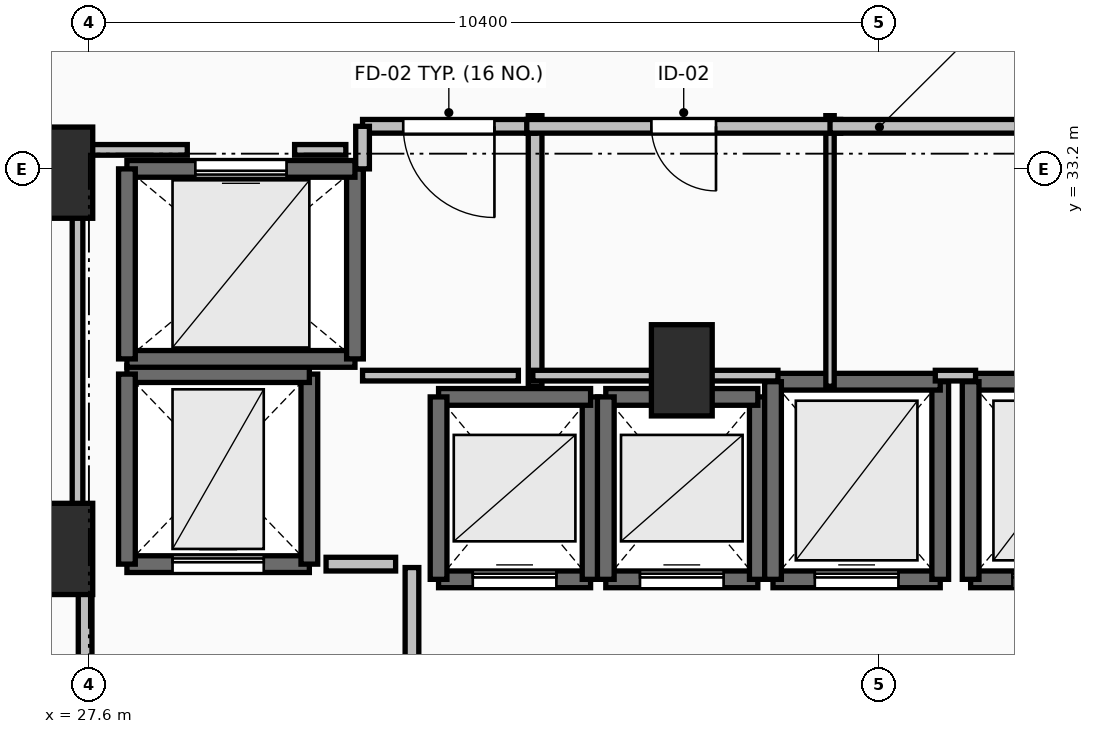
"""IFC4 building model, lengths in metres.
Left out: names, types, materials, properties, quantities, classifications, styles, units other than length and angle.
Written with IfcOpenShell. Run it as: python <this file> out.ifc"""

import sys

from ifc_helpers import new_model, si_unit, direction, frame, frame_2d, origin, origin_2d, place, context, subcontext, project, spatial, rectangle, extrude, element, fill, save


model = new_model("IFC4")
c1 = context("Model", 3, precision=1e-05, world=origin(), true_north=direction((0.0, 1.0)))
c2 = subcontext(c1, "Body", "Model", "MODEL_VIEW")
j1 = project(units=[si_unit("LENGTHUNIT", "METRE"), si_unit("PLANEANGLEUNIT", "RADIAN")], contexts=[c1])
p1 = place(None, origin())
s1 = spatial("IfcSite", under=j1, at=p1, CompositionType="ELEMENT")
p2 = place(p1, origin())
s2 = spatial("IfcBuilding", under=s1, at=p2, CompositionType="ELEMENT")
p3 = place(p2, origin())
s3 = spatial("IfcBuildingStorey", under=s2, at=p3, CompositionType="ELEMENT", Elevation=0.0)
for number, where, z_axis, x_axis in (
    (1, (27.25, 28.2, 0.0), (0.0, 0.0, 1.0), (1.0, 0.0, 0.0)),
    (2, (27.25, 33.15, 0.0), (0.0, 0.0, 1.0), (1.0, 0.0, 0.0)),
    (3, (35.4, 30.55, 0.0), (0.0, 0.0, 1.0), (1.0, 0.0, 0.0)),
):
    element("IfcColumn", number, at=place(p3, frame(where, z_axis=z_axis, x_axis=x_axis)), inside=s3, PredefinedType="PILASTER", context=c2, shape_type="SweptSolid", body=[
        extrude(rectangle(XDim=0.8, YDim=1.2, at=origin_2d()), origin(), (0.0, 0.0, 1.0), 4.8),
    ])
p4 = place(p3, frame((32.2, 27.8, 0.0), z_axis=(0.0, 0.0, 1.0), x_axis=(1.0, 0.0, 0.0)))
e4 = element("IfcWall", 4, at=p4, inside=s3, PredefinedType="SOLIDWALL", context=c2, shape_type="SweptSolid", body=[
    extrude(rectangle(XDim=2.0, YDim=0.22, at=frame_2d((1.0, 0.0))), origin(), (0.0, 0.0, 1.0), 4.48),
])
p5 = place(p4, frame((0.45, 0.0, 0.0)))
e5 = element("IfcOpeningElement", 5, at=p5, cuts=e4, PredefinedType="OPENING", context=c2, shape_type="SweptSolid", body=[
    extrude(rectangle(XDim=1.1, YDim=2.2, at=frame_2d((0.55, 1.1))), frame((0.0, 0.125, 0.0), z_axis=(0.0, -1.0, 0.0), x_axis=(1.0, 0.0, 0.0)), (0.0, 0.0, 1.0), 0.25),
])
p6 = place(p3, frame((34.2, 27.8, 0.0), z_axis=(0.0, 0.0, 1.0), x_axis=(0.0, 1.0, 0.0)))
e6 = element("IfcWall", 6, at=p6, inside=s3, PredefinedType="SOLIDWALL", context=c2, shape_type="SweptSolid", body=[
    extrude(rectangle(XDim=2.4, YDim=0.22, at=frame_2d((1.2, 0.0))), origin(), (0.0, 0.0, 1.0), 4.48),
])
p7 = place(p3, frame((34.2, 30.2, 0.0), z_axis=(0.0, 0.0, 1.0), x_axis=(-1.0, 0.0, 0.0)))
e7 = element("IfcWall", 7, at=p7, inside=s3, PredefinedType="SOLIDWALL", context=c2, shape_type="SweptSolid", body=[
    extrude(rectangle(XDim=2.0, YDim=0.22, at=frame_2d((1.0, 0.0))), origin(), (0.0, 0.0, 1.0), 4.48),
])
p8 = place(p3, frame((32.2, 30.2, 0.0), z_axis=(0.0, 0.0, 1.0), x_axis=(0.0, -1.0, 0.0)))
e8 = element("IfcWall", 8, at=p8, inside=s3, PredefinedType="SOLIDWALL", context=c2, shape_type="SweptSolid", body=[
    extrude(rectangle(XDim=2.4, YDim=0.22, at=frame_2d((1.2, 0.0))), origin(), (0.0, 0.0, 1.0), 4.48),
])
p9 = place(p3, frame((34.4, 27.8, 0.0), z_axis=(0.0, 0.0, 1.0), x_axis=(1.0, 0.0, 0.0)))
e9 = element("IfcWall", 9, at=p9, inside=s3, PredefinedType="SOLIDWALL", context=c2, shape_type="SweptSolid", body=[
    extrude(rectangle(XDim=2.0, YDim=0.22, at=frame_2d((1.0, 0.0))), origin(), (0.0, 0.0, 1.0), 4.48),
])
p10 = place(p9, frame((0.45, 0.0, 0.0)))
e10 = element("IfcOpeningElement", 10, at=p10, cuts=e9, PredefinedType="OPENING", context=c2, shape_type="SweptSolid", body=[
    extrude(rectangle(XDim=1.1, YDim=2.2, at=frame_2d((0.55, 1.1))), frame((0.0, 0.125, 0.0), z_axis=(0.0, -1.0, 0.0), x_axis=(1.0, 0.0, 0.0)), (0.0, 0.0, 1.0), 0.25),
])
p11 = place(p3, frame((36.4, 27.8, 0.0), z_axis=(0.0, 0.0, 1.0), x_axis=(0.0, 1.0, 0.0)))
e11 = element("IfcWall", 11, at=p11, inside=s3, PredefinedType="SOLIDWALL", context=c2, shape_type="SweptSolid", body=[
    extrude(rectangle(XDim=2.4, YDim=0.22, at=frame_2d((1.2, 0.0))), origin(), (0.0, 0.0, 1.0), 4.48),
])
p12 = place(p3, frame((36.4, 30.2, 0.0), z_axis=(0.0, 0.0, 1.0), x_axis=(-1.0, 0.0, 0.0)))
e12 = element("IfcWall", 12, at=p12, inside=s3, PredefinedType="SOLIDWALL", context=c2, shape_type="SweptSolid", body=[
    extrude(rectangle(XDim=2.0, YDim=0.22, at=frame_2d((1.0, 0.0))), origin(), (0.0, 0.0, 1.0), 4.48),
])
p13 = place(p3, frame((34.4, 30.2, 0.0), z_axis=(0.0, 0.0, 1.0), x_axis=(0.0, -1.0, 0.0)))
e13 = element("IfcWall", 13, at=p13, inside=s3, PredefinedType="SOLIDWALL", context=c2, shape_type="SweptSolid", body=[
    extrude(rectangle(XDim=2.4, YDim=0.22, at=frame_2d((1.2, 0.0))), origin(), (0.0, 0.0, 1.0), 4.48),
])
p14 = place(p3, frame((36.6, 27.8, 0.0), z_axis=(0.0, 0.0, 1.0), x_axis=(1.0, 0.0, 0.0)))
e14 = element("IfcWall", 14, at=p14, inside=s3, PredefinedType="SOLIDWALL", context=c2, shape_type="SweptSolid", body=[
    extrude(rectangle(XDim=2.2, YDim=0.22, at=frame_2d((1.1, 0.0))), origin(), (0.0, 0.0, 1.0), 4.48),
])
p15 = place(p14, frame((0.55, 0.0, 0.0)))
e15 = element("IfcOpeningElement", 15, at=p15, cuts=e14, PredefinedType="OPENING", context=c2, shape_type="SweptSolid", body=[
    extrude(rectangle(XDim=1.1, YDim=2.2, at=frame_2d((0.55, 1.1))), frame((0.0, 0.125, 0.0), z_axis=(0.0, -1.0, 0.0), x_axis=(1.0, 0.0, 0.0)), (0.0, 0.0, 1.0), 0.25),
])
p16 = place(p3, frame((38.8, 27.8, 0.0), z_axis=(0.0, 0.0, 1.0), x_axis=(0.0, 1.0, 0.0)))
e16 = element("IfcWall", 16, at=p16, inside=s3, PredefinedType="SOLIDWALL", context=c2, shape_type="SweptSolid", body=[
    extrude(rectangle(XDim=2.6, YDim=0.22, at=frame_2d((1.3, 0.0))), origin(), (0.0, 0.0, 1.0), 4.48),
])
p17 = place(p3, frame((38.8, 30.4, 0.0), z_axis=(0.0, 0.0, 1.0), x_axis=(-1.0, 0.0, 0.0)))
e17 = element("IfcWall", 17, at=p17, inside=s3, PredefinedType="SOLIDWALL", context=c2, shape_type="SweptSolid", body=[
    extrude(rectangle(XDim=2.2, YDim=0.22, at=frame_2d((1.1, 0.0))), origin(), (0.0, 0.0, 1.0), 4.48),
])
p18 = place(p3, frame((36.6, 30.4, 0.0), z_axis=(0.0, 0.0, 1.0), x_axis=(0.0, -1.0, 0.0)))
e18 = element("IfcWall", 18, at=p18, inside=s3, PredefinedType="SOLIDWALL", context=c2, shape_type="SweptSolid", body=[
    extrude(rectangle(XDim=2.6, YDim=0.22, at=frame_2d((1.3, 0.0))), origin(), (0.0, 0.0, 1.0), 4.48),
])
p19 = place(p3, frame((39.2, 27.8, 0.0), z_axis=(0.0, 0.0, 1.0), x_axis=(1.0, 0.0, 0.0)))
e19 = element("IfcWall", 19, at=p19, inside=s3, PredefinedType="SOLIDWALL", context=c2, shape_type="SweptSolid", body=[
    extrude(rectangle(XDim=2.2, YDim=0.22, at=frame_2d((1.1, 0.0))), origin(), (0.0, 0.0, 1.0), 4.48),
])
p20 = place(p19, frame((0.55, 0.0, 0.0)))
e20 = element("IfcOpeningElement", 20, at=p20, cuts=e19, PredefinedType="OPENING", context=c2, shape_type="SweptSolid", body=[
    extrude(rectangle(XDim=1.1, YDim=2.2, at=frame_2d((0.55, 1.1))), frame((0.0, 0.125, 0.0), z_axis=(0.0, -1.0, 0.0), x_axis=(1.0, 0.0, 0.0)), (0.0, 0.0, 1.0), 0.25),
])
p21 = place(p3, frame((41.4, 30.4, 0.0), z_axis=(0.0, 0.0, 1.0), x_axis=(-1.0, 0.0, 0.0)))
e21 = element("IfcWall", 21, at=p21, inside=s3, PredefinedType="SOLIDWALL", context=c2, shape_type="SweptSolid", body=[
    extrude(rectangle(XDim=2.2, YDim=0.22, at=frame_2d((1.1, 0.0))), origin(), (0.0, 0.0, 1.0), 4.48),
])
p22 = place(p3, frame((39.2, 30.4, 0.0), z_axis=(0.0, 0.0, 1.0), x_axis=(0.0, -1.0, 0.0)))
e22 = element("IfcWall", 22, at=p22, inside=s3, PredefinedType="SOLIDWALL", context=c2, shape_type="SweptSolid", body=[
    extrude(rectangle(XDim=2.6, YDim=0.22, at=frame_2d((1.3, 0.0))), origin(), (0.0, 0.0, 1.0), 4.48),
])
p23 = place(p3, frame((28.1, 28.0, 0.0), z_axis=(0.0, 0.0, 1.0), x_axis=(1.0, 0.0, 0.0)))
e23 = element("IfcWall", 23, at=p23, inside=s3, PredefinedType="SHEAR", context=c2, shape_type="SweptSolid", body=[
    extrude(rectangle(XDim=2.4, YDim=0.22, at=frame_2d((1.2, 0.0))), origin(), (0.0, 0.0, 1.0), 4.48),
])
p24 = place(p23, frame((0.6, 0.0, 0.0)))
e24 = element("IfcOpeningElement", 24, at=p24, cuts=e23, PredefinedType="OPENING", context=c2, shape_type="SweptSolid", body=[
    extrude(rectangle(XDim=1.2, YDim=2.2, at=frame_2d((0.6, 1.1))), frame((0.0, 0.125, 0.0), z_axis=(0.0, -1.0, 0.0), x_axis=(1.0, 0.0, 0.0)), (0.0, 0.0, 1.0), 0.25),
])
p25 = place(p3, frame((30.5, 28.0, 0.0), z_axis=(0.0, 0.0, 1.0), x_axis=(0.0, 1.0, 0.0)))
e25 = element("IfcWall", 25, at=p25, inside=s3, PredefinedType="SHEAR", context=c2, shape_type="SweptSolid", body=[
    extrude(rectangle(XDim=2.5, YDim=0.22, at=frame_2d((1.25, 0.0))), origin(), (0.0, 0.0, 1.0), 4.48),
])
p26 = place(p3, frame((30.5, 30.5, 0.0), z_axis=(0.0, 0.0, 1.0), x_axis=(-1.0, 0.0, 0.0)))
e26 = element("IfcWall", 26, at=p26, inside=s3, PredefinedType="SHEAR", context=c2, shape_type="SweptSolid", body=[
    extrude(rectangle(XDim=2.4, YDim=0.22, at=frame_2d((1.2, 0.0))), origin(), (0.0, 0.0, 1.0), 4.48),
])
p27 = place(p3, frame((28.1, 30.5, 0.0), z_axis=(0.0, 0.0, 1.0), x_axis=(0.0, -1.0, 0.0)))
e27 = element("IfcWall", 27, at=p27, inside=s3, PredefinedType="SHEAR", context=c2, shape_type="SweptSolid", body=[
    extrude(rectangle(XDim=2.5, YDim=0.22, at=frame_2d((1.25, 0.0))), origin(), (0.0, 0.0, 1.0), 4.48),
])
p28 = place(p3, frame((28.1, 30.7, 0.0), z_axis=(0.0, 0.0, 1.0), x_axis=(1.0, 0.0, 0.0)))
e28 = element("IfcWall", 28, at=p28, inside=s3, PredefinedType="SOLIDWALL", context=c2, shape_type="SweptSolid", body=[
    extrude(rectangle(XDim=3.0, YDim=0.22, at=frame_2d((1.5, 0.0))), origin(), (0.0, 0.0, 1.0), 4.48),
])
p29 = place(p3, frame((31.1, 30.7, 0.0), z_axis=(0.0, 0.0, 1.0), x_axis=(0.0, 1.0, 0.0)))
e29 = element("IfcWall", 29, at=p29, inside=s3, PredefinedType="SOLIDWALL", context=c2, shape_type="SweptSolid", body=[
    extrude(rectangle(XDim=2.5, YDim=0.22, at=frame_2d((1.25, 0.0))), origin(), (0.0, 0.0, 1.0), 4.48),
])
p30 = place(p3, frame((31.1, 33.2, 0.0), z_axis=(0.0, 0.0, 1.0), x_axis=(-1.0, 0.0, 0.0)))
e30 = element("IfcWall", 30, at=p30, inside=s3, PredefinedType="SOLIDWALL", context=c2, shape_type="SweptSolid", body=[
    extrude(rectangle(XDim=3.0, YDim=0.22, at=frame_2d((1.5, 0.0))), origin(), (0.0, 0.0, 1.0), 4.48),
])
p31 = place(p30, frame((0.9, 0.0, 0.0)))
e31 = element("IfcOpeningElement", 31, at=p31, cuts=e30, PredefinedType="OPENING", context=c2, shape_type="SweptSolid", body=[
    extrude(rectangle(XDim=1.2, YDim=2.2, at=frame_2d((0.6, 1.1))), frame((0.0, 0.125, 0.0), z_axis=(0.0, -1.0, 0.0), x_axis=(1.0, 0.0, 0.0)), (0.0, 0.0, 1.0), 0.25),
])
p32 = place(p3, frame((28.1, 33.2, 0.0), z_axis=(0.0, 0.0, 1.0), x_axis=(0.0, -1.0, 0.0)))
e32 = element("IfcWall", 32, at=p32, inside=s3, PredefinedType="SOLIDWALL", context=c2, shape_type="SweptSolid", body=[
    extrude(rectangle(XDim=2.5, YDim=0.22, at=frame_2d((1.25, 0.0))), origin(), (0.0, 0.0, 1.0), 4.48),
])
p33 = place(p3, frame((31.85, 24.045, 0.0), z_axis=(0.0, 0.0, 1.0), x_axis=(0.0, 1.0, 0.0)))
e33 = element("IfcWall", 33, at=p33, inside=s3, PredefinedType="PARTITIONING", context=c2, shape_type="SweptSolid", body=[
    extrude(rectangle(XDim=3.91, YDim=0.18, at=frame_2d((1.955, 0.0))), origin(), (0.0, 0.0, 1.0), 4.48),
])
p34 = place(p33, frame((1.355, 0.0, 0.0)))
e34 = element("IfcOpeningElement", 34, at=p34, cuts=e33, PredefinedType="OPENING", context=c2, shape_type="SweptSolid", body=[
    extrude(rectangle(XDim=1.2, YDim=2.15, at=frame_2d((0.6, 1.075))), frame((0.0, 0.105, 0.0), z_axis=(0.0, -1.0, 0.0), x_axis=(1.0, 0.0, 0.0)), (0.0, 0.0, 1.0), 0.21),
])
p35 = place(p3, frame((27.55, 28.0, 0.0), z_axis=(0.0, 0.0, 1.0), x_axis=(0.0, -1.0, 0.0)))
e35 = element("IfcWall", 35, at=p35, inside=s3, PredefinedType="PARTITIONING", context=c2, shape_type="SweptSolid", body=[
    extrude(rectangle(XDim=4.05, YDim=0.18, at=frame_2d((2.025, 0.0))), origin(), (0.0, 0.0, 1.0), 4.48),
])
p36 = place(p35, frame((1.425, 0.0, 0.0)))
e36 = element("IfcOpeningElement", 36, at=p36, cuts=e35, PredefinedType="OPENING", context=c2, shape_type="SweptSolid", body=[
    extrude(rectangle(XDim=1.2, YDim=2.15, at=frame_2d((0.6, 1.075))), frame((0.0, 0.105, 0.0), z_axis=(0.0, -1.0, 0.0), x_axis=(1.0, 0.0, 0.0)), (0.0, 0.0, 1.0), 0.21),
])
p37 = place(p3, frame((33.47, 30.34, 0.0), z_axis=(0.0, 0.0, 1.0), x_axis=(0.0, 1.0, 0.0)))
e37 = element("IfcWall", 37, at=p37, inside=s3, PredefinedType="PARTITIONING", context=c2, shape_type="SweptSolid", body=[
    extrude(rectangle(XDim=3.56, YDim=0.18, at=frame_2d((1.78, 0.0))), origin(), (0.0, 0.0, 1.0), 4.48),
])
p38 = place(p3, frame((33.47, 33.76, 0.0), z_axis=(0.0, 0.0, 1.0), x_axis=(-1.0, 0.0, 0.0)))
e38 = element("IfcWall", 38, at=p38, inside=s3, PredefinedType="PARTITIONING", context=c2, shape_type="SweptSolid", body=[
    extrude(rectangle(XDim=2.27, YDim=0.18, at=frame_2d((1.135, 0.0))), origin(), (0.0, 0.0, 1.0), 4.48),
])
p39 = place(p38, frame((0.535, 0.0, 0.0)))
e39 = element("IfcOpeningElement", 39, at=p39, cuts=e38, PredefinedType="OPENING", context=c2, shape_type="SweptSolid", body=[
    extrude(rectangle(XDim=1.2, YDim=2.15, at=frame_2d((0.6, 1.075))), frame((0.0, 0.105, 0.0), z_axis=(0.0, -1.0, 0.0), x_axis=(1.0, 0.0, 0.0)), (0.0, 0.0, 1.0), 0.21),
])
p40 = place(p3, frame((31.2, 33.76, 0.0), z_axis=(0.0, 0.0, 1.0), x_axis=(0.0, -1.0, 0.0)))
e40 = element("IfcWall", 40, at=p40, inside=s3, PredefinedType="PARTITIONING", context=c2, shape_type="SweptSolid", body=[
    extrude(rectangle(XDim=0.56, YDim=0.18, at=frame_2d((0.28, 0.0))), origin(), (0.0, 0.0, 1.0), 4.48),
])
p41 = place(p3, frame((37.35, 30.34, 0.0), z_axis=(0.0, 0.0, 1.0), x_axis=(0.0, 1.0, 0.0)))
e41 = element("IfcWall", 41, at=p41, inside=s3, PredefinedType="PARTITIONING", context=c2, shape_type="SweptSolid", body=[
    extrude(rectangle(XDim=3.56, YDim=0.11, at=frame_2d((1.78, 0.0))), origin(), (0.0, 0.0, 1.0), 3.672),
])
p42 = place(p3, frame((37.49, 33.76, 0.0), z_axis=(0.0, 0.0, 1.0), x_axis=(-1.0, 0.0, 0.0)))
e42 = element("IfcWall", 42, at=p42, inside=s3, PredefinedType="PARTITIONING", context=c2, shape_type="SweptSolid", body=[
    extrude(rectangle(XDim=4.13, YDim=0.18, at=frame_2d((2.065, 0.0))), origin(), (0.0, 0.0, 1.0), 4.48),
])
p43 = place(p42, frame((1.64, 0.0, 0.0)))
e43 = element("IfcOpeningElement", 43, at=p43, cuts=e42, PredefinedType="OPENING", context=c2, shape_type="SweptSolid", body=[
    extrude(rectangle(XDim=0.85, YDim=2.1, at=frame_2d((0.425, 1.05))), frame((0.0, 0.105, 0.0), z_axis=(0.0, -1.0, 0.0), x_axis=(1.0, 0.0, 0.0)), (0.0, 0.0, 1.0), 0.21),
])
p44 = place(p3, frame((44.26, 33.76, 0.0), z_axis=(0.0, 0.0, 1.0), x_axis=(-1.0, 0.0, 0.0)))
e44 = element("IfcWall", 44, at=p44, inside=s3, PredefinedType="PARTITIONING", context=c2, shape_type="SweptSolid", body=[
    extrude(rectangle(XDim=6.91, YDim=0.18, at=frame_2d((3.455, 0.0))), origin(), (0.0, 0.0, 1.0), 4.48),
])
p45 = place(p44, frame((3.03, 0.0, 0.0)))
e45 = element("IfcOpeningElement", 45, at=p45, cuts=e44, PredefinedType="OPENING", context=c2, shape_type="SweptSolid", body=[
    extrude(rectangle(XDim=0.85, YDim=2.1, at=frame_2d((0.425, 1.05))), frame((0.0, 0.105, 0.0), z_axis=(0.0, -1.0, 0.0), x_axis=(1.0, 0.0, 0.0)), (0.0, 0.0, 1.0), 0.21),
])
p46 = place(p3, frame((31.635, 28.0, 0.0), z_axis=(0.0, 0.0, 1.0), x_axis=(-1.0, 0.0, 0.0)))
e46 = element("IfcWall", 46, at=p46, inside=s3, PredefinedType="PARTITIONING", context=c2, shape_type="SweptSolid", body=[
    extrude(rectangle(XDim=0.915, YDim=0.18, at=frame_2d((0.458, 0.0))), origin(), (0.0, 0.0, 1.0), 4.48),
])
p47 = place(p3, frame((31.2, 30.48, 0.0), z_axis=(0.0, 0.0, 1.0), x_axis=(1.0, 0.0, 0.0)))
e47 = element("IfcWall", 47, at=p47, inside=s3, PredefinedType="PARTITIONING", context=c2, shape_type="SweptSolid", body=[
    extrude(rectangle(XDim=2.05, YDim=0.14, at=frame_2d((1.025, 0.0))), origin(), (0.0, 0.0, 1.0), 4.48),
])
p48 = place(p3, frame((33.44, 30.48, 0.0), z_axis=(0.0, 0.0, 1.0), x_axis=(1.0, 0.0, 0.0)))
e48 = element("IfcWall", 48, at=p48, inside=s3, PredefinedType="PARTITIONING", context=c2, shape_type="SweptSolid", body=[
    extrude(rectangle(XDim=3.225, YDim=0.14, at=frame_2d((1.613, 0.0))), origin(), (0.0, 0.0, 1.0), 3.672),
])
p49 = place(p3, frame((38.735, 30.48, 0.0), z_axis=(0.0, 0.0, 1.0), x_axis=(1.0, 0.0, 0.0)))
e49 = element("IfcWall", 49, at=p49, inside=s3, PredefinedType="PARTITIONING", context=c2, shape_type="SweptSolid", body=[
    extrude(rectangle(XDim=0.53, YDim=0.14, at=frame_2d((0.265, 0.0))), origin(), (0.0, 0.0, 1.0), 3.672),
])
p50 = place(p3, frame((27.45, 28.196, 0.0), z_axis=(0.0, 0.0, 1.0), x_axis=(0.0, 1.0, 0.0)))
e50 = element("IfcWall", 50, at=p50, inside=s3, PredefinedType="PARTITIONING", context=c2, shape_type="SweptSolid", body=[
    extrude(rectangle(XDim=5.254, YDim=0.14, at=frame_2d((2.627, 0.0))), origin(), (0.0, 0.0, 1.0), 3.672),
])
p51 = place(p3, frame((27.6, 33.45, 0.0), z_axis=(0.0, 0.0, 1.0), x_axis=(1.0, 0.0, 0.0)))
e51 = element("IfcWall", 51, at=p51, inside=s3, PredefinedType="PARTITIONING", context=c2, shape_type="SweptSolid", body=[
    extrude(rectangle(XDim=1.294, YDim=0.14, at=frame_2d((0.647, 0.0))), origin(), (0.0, 0.0, 1.0), 3.672),
])
p52 = place(p3, frame((30.306, 33.45, 0.0), z_axis=(0.0, 0.0, 1.0), x_axis=(1.0, 0.0, 0.0)))
e52 = element("IfcWall", 52, at=p52, inside=s3, PredefinedType="PARTITIONING", context=c2, shape_type="SweptSolid", body=[
    extrude(rectangle(XDim=0.674, YDim=0.14, at=frame_2d((0.337, 0.0))), origin(), (0.0, 0.0, 1.0), 4.48),
])
p53 = place(p5, origin())
e53 = element("IfcDoor", 53, at=p53, inside=s3, OperationType="SLIDING_TO_LEFT", PredefinedType="DOOR", context=c2, shape_type="SweptSolid", body=[
    extrude(rectangle(XDim=1.1, YDim=2.2, at=frame_2d((0.55, 1.1))), frame((0.0, 0.025, 0.0), z_axis=(0.0, -1.0, 0.0), x_axis=(1.0, 0.0, 0.0)), (0.0, 0.0, 1.0), 0.05),
])
fill(e5, e53)
p54 = place(p10, origin())
e54 = element("IfcDoor", 54, at=p54, inside=s3, OperationType="SLIDING_TO_LEFT", PredefinedType="DOOR", context=c2, shape_type="SweptSolid", body=[
    extrude(rectangle(XDim=1.1, YDim=2.2, at=frame_2d((0.55, 1.1))), frame((0.0, 0.025, 0.0), z_axis=(0.0, -1.0, 0.0), x_axis=(1.0, 0.0, 0.0)), (0.0, 0.0, 1.0), 0.05),
])
fill(e10, e54)
p55 = place(p15, origin())
e55 = element("IfcDoor", 55, at=p55, inside=s3, OperationType="SLIDING_TO_LEFT", PredefinedType="DOOR", context=c2, shape_type="SweptSolid", body=[
    extrude(rectangle(XDim=1.1, YDim=2.2, at=frame_2d((0.55, 1.1))), frame((0.0, 0.025, 0.0), z_axis=(0.0, -1.0, 0.0), x_axis=(1.0, 0.0, 0.0)), (0.0, 0.0, 1.0), 0.05),
])
fill(e15, e55)
p56 = place(p20, origin())
e56 = element("IfcDoor", 56, at=p56, inside=s3, OperationType="SLIDING_TO_LEFT", PredefinedType="DOOR", context=c2, shape_type="SweptSolid", body=[
    extrude(rectangle(XDim=1.1, YDim=2.2, at=frame_2d((0.55, 1.1))), frame((0.0, 0.025, 0.0), z_axis=(0.0, -1.0, 0.0), x_axis=(1.0, 0.0, 0.0)), (0.0, 0.0, 1.0), 0.05),
])
fill(e20, e56)
p57 = place(p24, origin())
e57 = element("IfcDoor", 57, at=p57, inside=s3, OperationType="SLIDING_TO_LEFT", PredefinedType="DOOR", context=c2, shape_type="SweptSolid", body=[
    extrude(rectangle(XDim=1.2, YDim=2.2, at=frame_2d((0.6, 1.1))), frame((0.0, 0.025, 0.0), z_axis=(0.0, -1.0, 0.0), x_axis=(1.0, 0.0, 0.0)), (0.0, 0.0, 1.0), 0.05),
])
fill(e24, e57)
p58 = place(p31, origin())
e58 = element("IfcDoor", 58, at=p58, inside=s3, OperationType="SLIDING_TO_LEFT", PredefinedType="DOOR", context=c2, shape_type="SweptSolid", body=[
    extrude(rectangle(XDim=1.2, YDim=2.2, at=frame_2d((0.6, 1.1))), frame((0.0, 0.025, 0.0), z_axis=(0.0, -1.0, 0.0), x_axis=(1.0, 0.0, 0.0)), (0.0, 0.0, 1.0), 0.05),
])
fill(e31, e58)
p59 = place(p39, origin())
e59 = element("IfcDoor", 59, at=p59, inside=s3, OperationType="SINGLE_SWING_LEFT", PredefinedType="DOOR", context=c2, shape_type="SweptSolid", body=[
    extrude(rectangle(XDim=1.2, YDim=2.15, at=frame_2d((0.6, 1.075))), frame((0.0, 0.025, 0.0), z_axis=(0.0, -1.0, 0.0), x_axis=(1.0, 0.0, 0.0)), (0.0, 0.0, 1.0), 0.05),
])
fill(e39, e59)
p60 = place(p43, origin())
e60 = element("IfcDoor", 60, at=p60, inside=s3, OperationType="SINGLE_SWING_LEFT", PredefinedType="DOOR", context=c2, shape_type="SweptSolid", body=[
    extrude(rectangle(XDim=0.85, YDim=2.1, at=frame_2d((0.425, 1.05))), frame((0.0, 0.025, 0.0), z_axis=(0.0, -1.0, 0.0), x_axis=(1.0, 0.0, 0.0)), (0.0, 0.0, 1.0), 0.05),
])
fill(e43, e60)
save(model, sys.argv[1])
